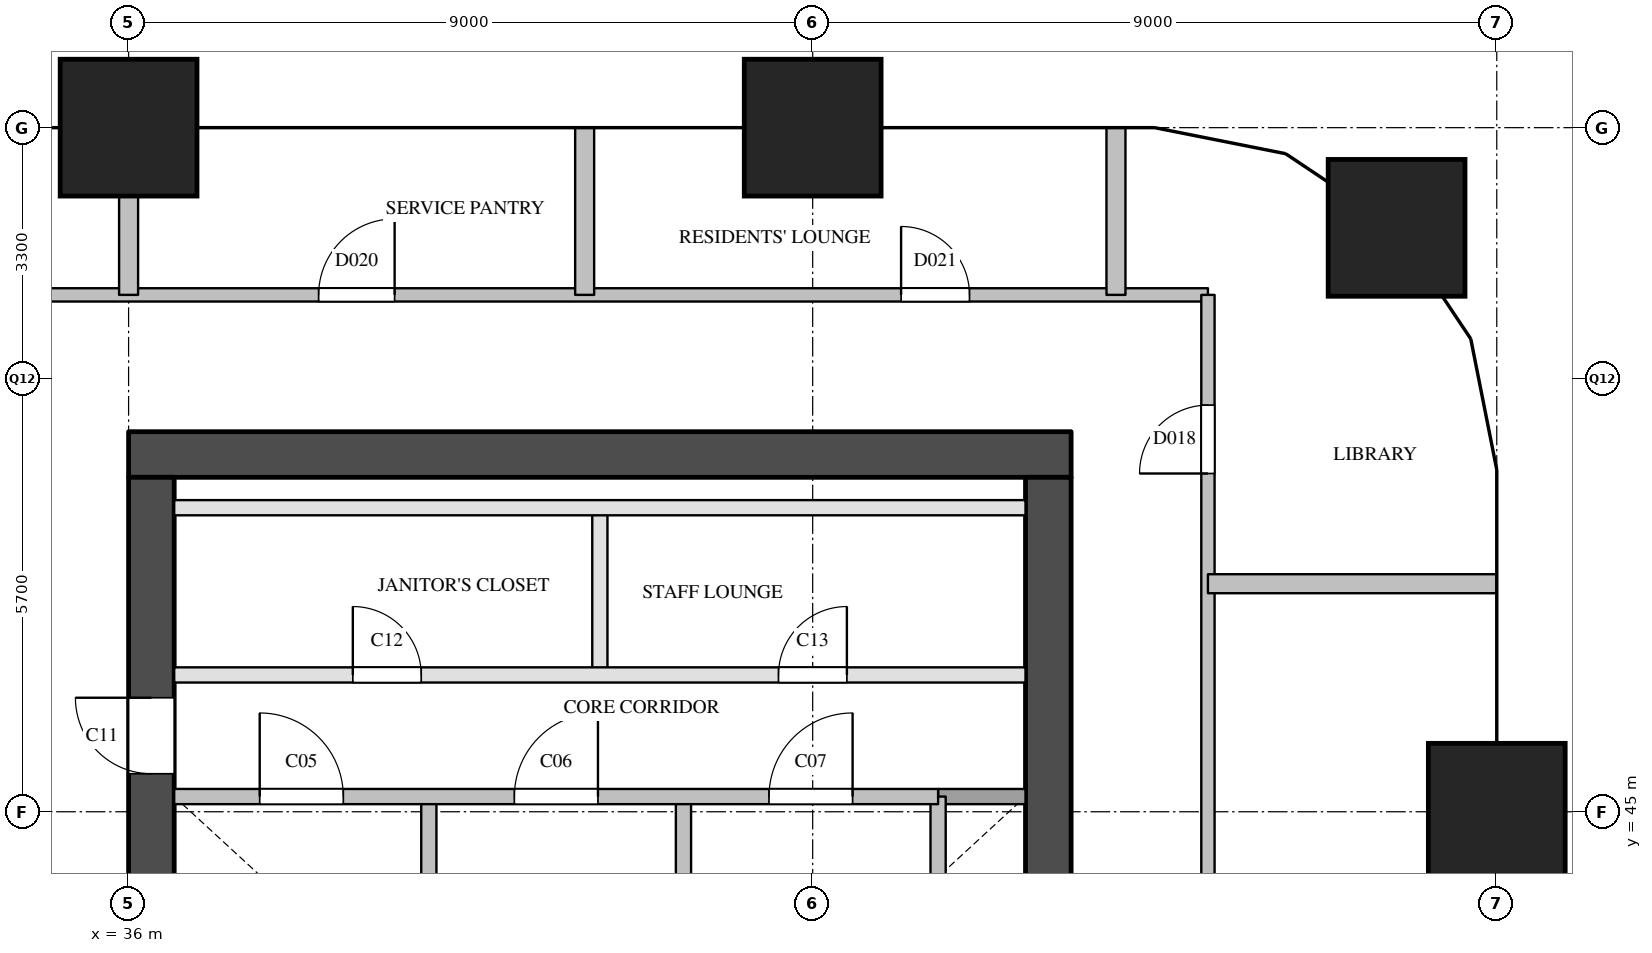
"""IFC4 building model, lengths in metres.
Left out: names, types, materials, properties, quantities, classifications, styles, units other than length and angle.
Written with IfcOpenShell. Run it as: python <this file> out.ifc"""

import sys

from ifc_helpers import new_model, si_unit, direction, frame, frame_2d, origin, origin_2d, place, context, subcontext, project, spatial, rectangle, extrude, element, fill, save


model = new_model("IFC4")
c1 = context("Model", 3, precision=1e-05, world=origin(), true_north=direction((0.0, 1.0)))
c2 = subcontext(c1, "Body", "Model", "MODEL_VIEW")
j1 = project(units=[si_unit("LENGTHUNIT", "METRE"), si_unit("PLANEANGLEUNIT", "RADIAN")], contexts=[c1])
p1 = place(None, origin())
s1 = spatial("IfcSite", under=j1, at=p1, CompositionType="ELEMENT")
p2 = place(p1, origin())
s2 = spatial("IfcBuilding", under=s1, at=p2, CompositionType="ELEMENT")
p3 = place(p2, frame((0.0, 0.0, 115.8)))
s3 = spatial("IfcBuildingStorey", under=s2, at=p3, CompositionType="ELEMENT", Elevation=115.8)
for number, where, z_axis, x_axis in (
    (1, (36.0, 54.0, 0.0), (0.0, 0.0, 1.0), (1.0, 0.0, 0.0)),
    (2, (45.0, 54.0, 0.0), (0.0, 0.0, 1.0), (1.0, 0.0, 0.0)),
    (3, (54.0, 45.0, 0.0), (0.0, 0.0, 1.0), (1.0, 0.0, 0.0)),
    (4, (52.682, 52.682, 0.0), (0.0, 0.0, 1.0), (1.0, 0.0, 0.0)),
):
    element("IfcColumn", number, at=place(p3, frame(where, z_axis=z_axis, x_axis=x_axis)), inside=s3, PredefinedType="COLUMN", context=c2, shape_type="SweptSolid", body=[
        extrude(rectangle(XDim=1.8, YDim=1.8, at=origin_2d()), origin(), (0.0, 0.0, 1.0), 3.8),
    ])
p4 = place(p3, frame((36.0, 49.7, 0.0), z_axis=(0.0, 0.0, 1.0), x_axis=(1.0, 0.0, 0.0)))
e5 = element("IfcWall", 5, at=p4, inside=s3, PredefinedType="SHEAR", context=c2, shape_type="SweptSolid", body=[
    extrude(rectangle(XDim=12.4, YDim=0.6, at=frame_2d((6.2, 0.0))), origin(), (0.0, 0.0, 1.0), 3.5),
])
p5 = place(p3, frame((36.3, 29.1, 0.0), z_axis=(0.0, 0.0, 1.0), x_axis=(0.0, 1.0, 0.0)))
e6 = element("IfcWall", 6, at=p5, inside=s3, PredefinedType="SHEAR", context=c2, shape_type="SweptSolid", body=[
    extrude(rectangle(XDim=20.3, YDim=0.6, at=frame_2d((10.15, 0.0))), origin(), (0.0, 0.0, 1.0), 3.5),
])
p6 = place(p5, frame((3.6, 0.0, 0.0)))
e7 = element("IfcOpeningElement", 7, at=p6, cuts=e6, PredefinedType="OPENING", context=c2, shape_type="SweptSolid", body=[
    extrude(rectangle(XDim=1.8, YDim=2.1, at=frame_2d((0.9, 1.05))), frame((0.0, 0.31, 0.0), z_axis=(0.0, -1.0, 0.0), x_axis=(1.0, 0.0, 0.0)), (0.0, 0.0, 1.0), 0.62),
])
p7 = place(p5, frame((16.4, 0.0, 0.0)))
e8 = element("IfcOpeningElement", 8, at=p7, cuts=e6, PredefinedType="OPENING", context=c2, shape_type="SweptSolid", body=[
    extrude(rectangle(XDim=1.0, YDim=2.1, at=frame_2d((0.5, 1.05))), frame((0.0, 0.31, 0.0), z_axis=(0.0, -1.0, 0.0), x_axis=(1.0, 0.0, 0.0)), (0.0, 0.0, 1.0), 0.62),
])
p8 = place(p3, frame((48.1, 29.1, 0.0), z_axis=(0.0, 0.0, 1.0), x_axis=(0.0, 1.0, 0.0)))
e9 = element("IfcWall", 9, at=p8, inside=s3, PredefinedType="SHEAR", context=c2, shape_type="SweptSolid", body=[
    extrude(rectangle(XDim=20.3, YDim=0.6, at=frame_2d((10.15, 0.0))), origin(), (0.0, 0.0, 1.0), 3.5),
])
p9 = place(p8, frame((12.5, 0.0, 0.0)))
e10 = element("IfcOpeningElement", 10, at=p9, cuts=e9, PredefinedType="OPENING", context=c2, shape_type="SweptSolid", body=[
    extrude(rectangle(XDim=0.7, YDim=2.1, at=frame_2d((0.35, 1.05))), frame((0.0, 0.31, 0.0), z_axis=(0.0, -1.0, 0.0), x_axis=(1.0, 0.0, 0.0)), (0.0, 0.0, 1.0), 0.62),
])
p10 = place(p8, frame((3.9, 0.0, 0.0)))
e11 = element("IfcOpeningElement", 11, at=p10, cuts=e9, PredefinedType="OPENING", context=c2, shape_type="SweptSolid", body=[
    extrude(rectangle(XDim=1.8, YDim=2.1, at=frame_2d((0.9, 1.05))), frame((0.0, 0.31, 0.0), z_axis=(0.0, -1.0, 0.0), x_axis=(1.0, 0.0, 0.0)), (0.0, 0.0, 1.0), 0.62),
])
p11 = place(p3, frame((39.95, 40.78, 0.0), z_axis=(0.0, 0.0, 1.0), x_axis=(0.0, 1.0, 0.0)))
e12 = element("IfcWall", 12, at=p11, inside=s3, PredefinedType="SOLIDWALL", context=c2, shape_type="SweptSolid", body=[
    extrude(rectangle(XDim=4.42, YDim=0.2, at=frame_2d((2.21, 0.0))), origin(), (0.0, 0.0, 1.0), 3.5),
])
p12 = place(p3, frame((42.2, 46.8, 0.0), z_axis=(0.0, 0.0, 1.0), x_axis=(0.0, 1.0, 0.0)))
e13 = element("IfcWall", 13, at=p12, inside=s3, PredefinedType="PARTITIONING", context=c2, shape_type="SweptSolid", body=[
    extrude(rectangle(XDim=2.2, YDim=0.2, at=frame_2d((1.1, 0.0))), origin(), (0.0, 0.0, 1.0), 3.5),
])
for number, where, z_axis, x_axis in (
    (14, (43.3, 40.78, 0.0), (0.0, 0.0, 1.0), (0.0, 1.0, 0.0)),
    (15, (46.65, 40.78, 0.0), (0.0, 0.0, 1.0), (0.0, 1.0, 0.0)),
):
    element("IfcWall", number, at=place(p3, frame(where, z_axis=z_axis, x_axis=x_axis)), inside=s3, PredefinedType="SOLIDWALL", context=c2, shape_type="SweptSolid", body=[
        extrude(rectangle(XDim=4.42, YDim=0.2, at=frame_2d((2.21, 0.0))), origin(), (0.0, 0.0, 1.0), 3.5),
    ])
p13 = place(p3, frame((46.65, 45.2, 0.0), z_axis=(0.0, 0.0, 1.0), x_axis=(1.0, 0.0, 0.0)))
e16 = element("IfcWall", 16, at=p13, inside=s3, PredefinedType="SOLIDWALL", context=c2, shape_type="SweptSolid", body=[
    extrude(rectangle(XDim=1.15, YDim=0.2, at=frame_2d((0.575, 0.0))), origin(), (0.0, 0.0, 1.0), 3.5),
])
p14 = place(p3, frame((36.6, 45.2, 0.0), z_axis=(0.0, 0.0, 1.0), x_axis=(1.0, 0.0, 0.0)))
e17 = element("IfcWall", 17, at=p14, inside=s3, PredefinedType="SOLIDWALL", context=c2, shape_type="SweptSolid", body=[
    extrude(rectangle(XDim=10.05, YDim=0.2, at=frame_2d((5.025, 0.0))), origin(), (0.0, 0.0, 1.0), 3.5),
])
p15 = place(p14, frame((1.125, 0.0, 0.0)))
e18 = element("IfcOpeningElement", 18, at=p15, cuts=e17, PredefinedType="OPENING", context=c2, shape_type="SweptSolid", body=[
    extrude(rectangle(XDim=1.1, YDim=2.1, at=frame_2d((0.55, 1.05))), frame((0.0, 0.11, 0.0), z_axis=(0.0, -1.0, 0.0), x_axis=(1.0, 0.0, 0.0)), (0.0, 0.0, 1.0), 0.22),
])
p16 = place(p14, frame((4.475, 0.0, 0.0)))
e19 = element("IfcOpeningElement", 19, at=p16, cuts=e17, PredefinedType="OPENING", context=c2, shape_type="SweptSolid", body=[
    extrude(rectangle(XDim=1.1, YDim=2.1, at=frame_2d((0.55, 1.05))), frame((0.0, 0.11, 0.0), z_axis=(0.0, -1.0, 0.0), x_axis=(1.0, 0.0, 0.0)), (0.0, 0.0, 1.0), 0.22),
])
p17 = place(p14, frame((7.825, 0.0, 0.0)))
e20 = element("IfcOpeningElement", 20, at=p17, cuts=e17, PredefinedType="OPENING", context=c2, shape_type="SweptSolid", body=[
    extrude(rectangle(XDim=1.1, YDim=2.1, at=frame_2d((0.55, 1.05))), frame((0.0, 0.11, 0.0), z_axis=(0.0, -1.0, 0.0), x_axis=(1.0, 0.0, 0.0)), (0.0, 0.0, 1.0), 0.22),
])
p18 = place(p3, frame((36.6, 46.8, 0.0), z_axis=(0.0, 0.0, 1.0), x_axis=(1.0, 0.0, 0.0)))
e21 = element("IfcWall", 21, at=p18, inside=s3, PredefinedType="PARTITIONING", context=c2, shape_type="SweptSolid", body=[
    extrude(rectangle(XDim=11.2, YDim=0.2, at=frame_2d((5.6, 0.0))), origin(), (0.0, 0.0, 1.0), 3.5),
])
p19 = place(p18, frame((2.35, 0.0, 0.0)))
e22 = element("IfcOpeningElement", 22, at=p19, cuts=e21, PredefinedType="OPENING", context=c2, shape_type="SweptSolid", body=[
    extrude(rectangle(XDim=0.9, YDim=2.1, at=frame_2d((0.45, 1.05))), frame((0.0, 0.11, 0.0), z_axis=(0.0, -1.0, 0.0), x_axis=(1.0, 0.0, 0.0)), (0.0, 0.0, 1.0), 0.22),
])
p20 = place(p18, frame((7.95, 0.0, 0.0)))
e23 = element("IfcOpeningElement", 23, at=p20, cuts=e21, PredefinedType="OPENING", context=c2, shape_type="SweptSolid", body=[
    extrude(rectangle(XDim=0.9, YDim=2.1, at=frame_2d((0.45, 1.05))), frame((0.0, 0.11, 0.0), z_axis=(0.0, -1.0, 0.0), x_axis=(1.0, 0.0, 0.0)), (0.0, 0.0, 1.0), 0.22),
])
p21 = place(p3, frame((36.6, 49.0, 0.0), z_axis=(0.0, 0.0, 1.0), x_axis=(1.0, 0.0, 0.0)))
e24 = element("IfcWall", 24, at=p21, inside=s3, PredefinedType="PARTITIONING", context=c2, shape_type="SweptSolid", body=[
    extrude(rectangle(XDim=11.2, YDim=0.2, at=frame_2d((5.6, 0.0))), origin(), (0.0, 0.0, 1.0), 3.5),
])
p22 = place(p3, frame((34.2, 51.8, 0.0), z_axis=(0.0, 0.0, 1.0), x_axis=(1.0, 0.0, 0.0)))
e25 = element("IfcWall", 25, at=p22, inside=s3, PredefinedType="PARTITIONING", context=c2, shape_type="SweptSolid", body=[
    extrude(rectangle(XDim=16.0, YDim=0.175, at=frame_2d((8.0, 0.0))), origin(), (0.0, 0.0, 1.0), 3.5),
])
p23 = place(p22, frame((4.3, 0.0, 0.0)))
e26 = element("IfcOpeningElement", 26, at=p23, cuts=e25, PredefinedType="OPENING", context=c2, shape_type="SweptSolid", body=[
    extrude(rectangle(XDim=1.0, YDim=2.1, at=frame_2d((0.5, 1.05))), frame((0.0, 0.097, 0.0), z_axis=(0.0, -1.0, 0.0), x_axis=(1.0, 0.0, 0.0)), (0.0, 0.0, 1.0), 0.195),
])
p24 = place(p22, frame((11.963, 0.0, 0.0)))
e27 = element("IfcOpeningElement", 27, at=p24, cuts=e25, PredefinedType="OPENING", context=c2, shape_type="SweptSolid", body=[
    extrude(rectangle(XDim=0.9, YDim=2.1, at=frame_2d((0.45, 1.05))), frame((0.0, 0.097, 0.0), z_axis=(0.0, -1.0, 0.0), x_axis=(1.0, 0.0, 0.0)), (0.0, 0.0, 1.0), 0.195),
])
p25 = place(p3, frame((50.2, 26.7, 0.0), z_axis=(0.0, 0.0, 1.0), x_axis=(0.0, 1.0, 0.0)))
e28 = element("IfcWall", 28, at=p25, inside=s3, PredefinedType="PARTITIONING", context=c2, shape_type="SweptSolid", body=[
    extrude(rectangle(XDim=25.1, YDim=0.175, at=frame_2d((12.55, 0.0))), origin(), (0.0, 0.0, 1.0), 2.5),
])
p26 = place(p25, frame((5.85, 0.0, 0.0)))
e29 = element("IfcOpeningElement", 29, at=p26, cuts=e28, PredefinedType="OPENING", context=c2, shape_type="SweptSolid", body=[
    extrude(rectangle(XDim=0.9, YDim=2.1, at=frame_2d((0.45, 1.05))), frame((0.0, 0.097, 0.0), z_axis=(0.0, -1.0, 0.0), x_axis=(1.0, 0.0, 0.0)), (0.0, 0.0, 1.0), 0.195),
])
p27 = place(p25, frame((14.85, 0.0, 0.0)))
e30 = element("IfcOpeningElement", 30, at=p27, cuts=e28, PredefinedType="OPENING", context=c2, shape_type="SweptSolid", body=[
    extrude(rectangle(XDim=0.9, YDim=2.1, at=frame_2d((0.45, 1.05))), frame((0.0, 0.097, 0.0), z_axis=(0.0, -1.0, 0.0), x_axis=(1.0, 0.0, 0.0)), (0.0, 0.0, 1.0), 0.195),
])
p28 = place(p25, frame((22.75, 0.0, 0.0)))
e31 = element("IfcOpeningElement", 31, at=p28, cuts=e28, PredefinedType="OPENING", context=c2, shape_type="SweptSolid", body=[
    extrude(rectangle(XDim=0.9, YDim=2.1, at=frame_2d((0.45, 1.05))), frame((0.0, 0.097, 0.0), z_axis=(0.0, -1.0, 0.0), x_axis=(1.0, 0.0, 0.0)), (0.0, 0.0, 1.0), 0.195),
])
p29 = place(p3, frame((50.2, 48.0, 0.0), z_axis=(0.0, 0.0, 1.0), x_axis=(1.0, 0.0, 0.0)))
e32 = element("IfcWall", 32, at=p29, inside=s3, PredefinedType="PARTITIONING", context=c2, shape_type="SweptSolid", body=[
    extrude(rectangle(XDim=3.8, YDim=0.25, at=frame_2d((1.9, 0.0))), origin(), (0.0, 0.0, 1.0), 2.5),
])
p30 = place(p3, frame((36.0, 51.8, 0.0), z_axis=(0.0, 0.0, 1.0), x_axis=(0.0, 1.0, 0.0)))
e33 = element("IfcWall", 33, at=p30, inside=s3, PredefinedType="PARTITIONING", context=c2, shape_type="SweptSolid", body=[
    extrude(rectangle(XDim=2.2, YDim=0.25, at=frame_2d((1.1, 0.0))), origin(), (0.0, 0.0, 1.0), 3.5),
])
for number, where, z_axis, x_axis in (
    (34, (42.0, 51.8, 0.0), (0.0, 0.0, 1.0), (0.0, 1.0, 0.0)),
    (35, (48.99, 51.8, 0.0), (0.0, 0.0, 1.0), (0.0, 1.0, 0.0)),
):
    element("IfcWall", number, at=place(p3, frame(where, z_axis=z_axis, x_axis=x_axis)), inside=s3, PredefinedType="PARTITIONING", context=c2, shape_type="SweptSolid", body=[
        extrude(rectangle(XDim=2.2, YDim=0.25, at=frame_2d((1.1, 0.0))), origin(), (0.0, 0.0, 1.0), 2.5),
    ])
p31 = place(p15, origin())
e36 = element("IfcDoor", 36, at=p31, inside=s3, OperationType="SINGLE_SWING_LEFT", PredefinedType="DOOR", context=c2, shape_type="SweptSolid", body=[
    extrude(rectangle(XDim=1.1, YDim=2.1, at=frame_2d((0.55, 1.05))), frame((0.0, 0.025, 0.0), z_axis=(0.0, -1.0, 0.0), x_axis=(1.0, 0.0, 0.0)), (0.0, 0.0, 1.0), 0.05),
])
fill(e18, e36)
p32 = place(p16, origin())
e37 = element("IfcDoor", 37, at=p32, inside=s3, OperationType="SINGLE_SWING_RIGHT", PredefinedType="DOOR", context=c2, shape_type="SweptSolid", body=[
    extrude(rectangle(XDim=1.1, YDim=2.1, at=frame_2d((0.55, 1.05))), frame((0.0, 0.025, 0.0), z_axis=(0.0, -1.0, 0.0), x_axis=(1.0, 0.0, 0.0)), (0.0, 0.0, 1.0), 0.05),
])
fill(e19, e37)
p33 = place(p17, origin())
e38 = element("IfcDoor", 38, at=p33, inside=s3, OperationType="SINGLE_SWING_RIGHT", PredefinedType="DOOR", context=c2, shape_type="SweptSolid", body=[
    extrude(rectangle(XDim=1.1, YDim=2.1, at=frame_2d((0.55, 1.05))), frame((0.0, 0.025, 0.0), z_axis=(0.0, -1.0, 0.0), x_axis=(1.0, 0.0, 0.0)), (0.0, 0.0, 1.0), 0.05),
])
fill(e20, e38)
p34 = place(p7, origin())
e39 = element("IfcDoor", 39, at=p34, inside=s3, OperationType="SINGLE_SWING_RIGHT", PredefinedType="DOOR", context=c2, shape_type="SweptSolid", body=[
    extrude(rectangle(XDim=1.0, YDim=2.1, at=frame_2d((0.5, 1.05))), frame((0.0, 0.025, 0.0), z_axis=(0.0, -1.0, 0.0), x_axis=(1.0, 0.0, 0.0)), (0.0, 0.0, 1.0), 0.05),
])
fill(e8, e39)
p35 = place(p19, origin())
e40 = element("IfcDoor", 40, at=p35, inside=s3, OperationType="SINGLE_SWING_LEFT", PredefinedType="DOOR", context=c2, shape_type="SweptSolid", body=[
    extrude(rectangle(XDim=0.9, YDim=2.1, at=frame_2d((0.45, 1.05))), frame((0.0, 0.025, 0.0), z_axis=(0.0, -1.0, 0.0), x_axis=(1.0, 0.0, 0.0)), (0.0, 0.0, 1.0), 0.05),
])
fill(e22, e40)
p36 = place(p20, origin())
e41 = element("IfcDoor", 41, at=p36, inside=s3, OperationType="SINGLE_SWING_RIGHT", PredefinedType="DOOR", context=c2, shape_type="SweptSolid", body=[
    extrude(rectangle(XDim=0.9, YDim=2.1, at=frame_2d((0.45, 1.05))), frame((0.0, 0.025, 0.0), z_axis=(0.0, -1.0, 0.0), x_axis=(1.0, 0.0, 0.0)), (0.0, 0.0, 1.0), 0.05),
])
fill(e23, e41)
p37 = place(p28, origin())
e42 = element("IfcDoor", 42, at=p37, inside=s3, OperationType="SINGLE_SWING_LEFT", PredefinedType="DOOR", context=c2, shape_type="SweptSolid", body=[
    extrude(rectangle(XDim=0.9, YDim=2.1, at=frame_2d((0.45, 1.05))), frame((0.0, 0.025, 0.0), z_axis=(0.0, -1.0, 0.0), x_axis=(1.0, 0.0, 0.0)), (0.0, 0.0, 1.0), 0.05),
])
fill(e31, e42)
p38 = place(p23, origin())
e43 = element("IfcDoor", 43, at=p38, inside=s3, OperationType="SINGLE_SWING_RIGHT", PredefinedType="DOOR", context=c2, shape_type="SweptSolid", body=[
    extrude(rectangle(XDim=1.0, YDim=2.1, at=frame_2d((0.5, 1.05))), frame((0.0, 0.025, 0.0), z_axis=(0.0, -1.0, 0.0), x_axis=(1.0, 0.0, 0.0)), (0.0, 0.0, 1.0), 0.05),
])
fill(e26, e43)
p39 = place(p24, origin())
e44 = element("IfcDoor", 44, at=p39, inside=s3, OperationType="SINGLE_SWING_LEFT", PredefinedType="DOOR", context=c2, shape_type="SweptSolid", body=[
    extrude(rectangle(XDim=0.9, YDim=2.1, at=frame_2d((0.45, 1.05))), frame((0.0, 0.025, 0.0), z_axis=(0.0, -1.0, 0.0), x_axis=(1.0, 0.0, 0.0)), (0.0, 0.0, 1.0), 0.05),
])
fill(e27, e44)
save(model, sys.argv[1])
